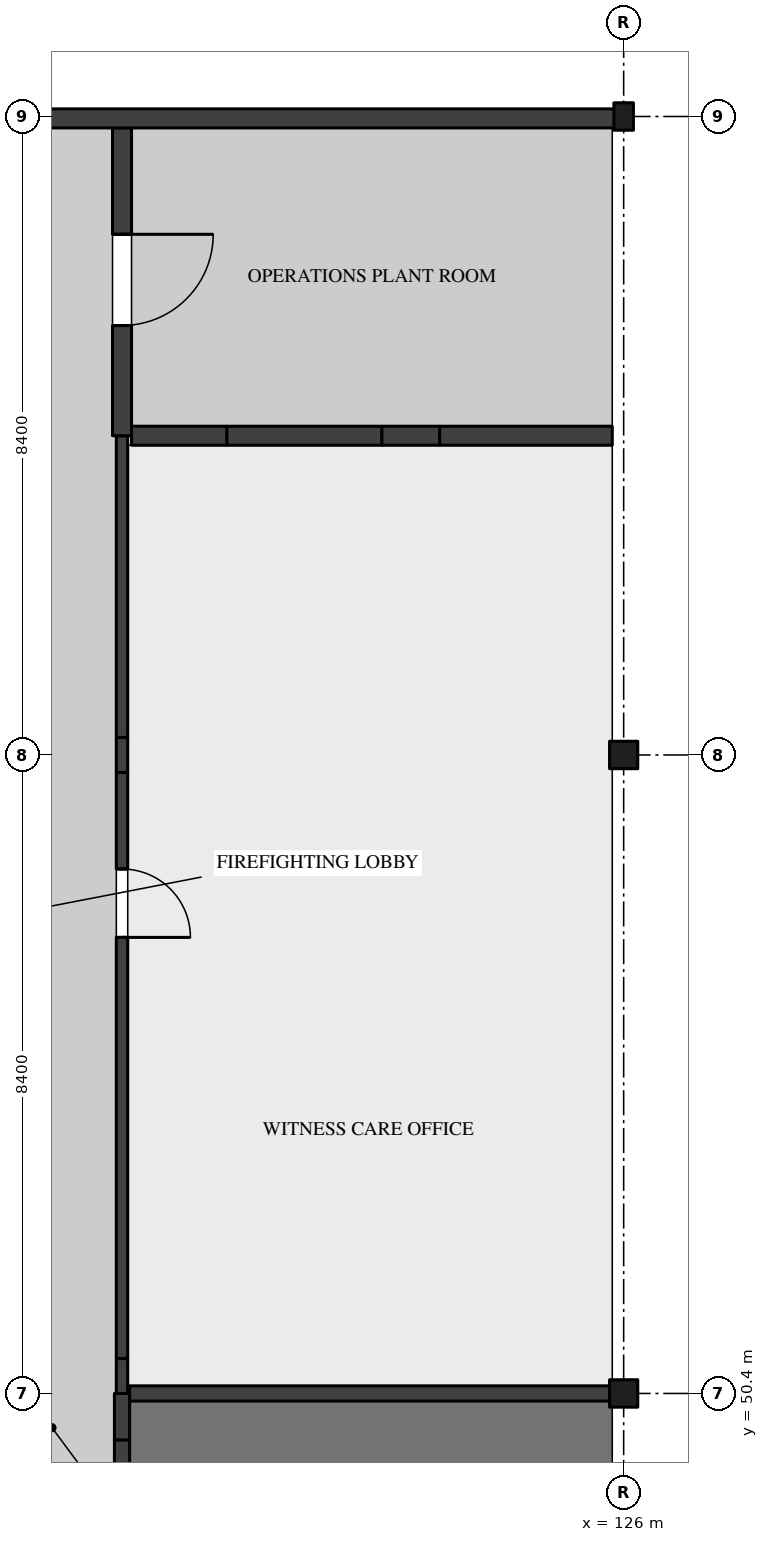
"""IFC4 building model, lengths in metres.
Left out: names, types, materials, properties, quantities, classifications, styles, units other than length and angle.
Written with IfcOpenShell. Run it as: python <this file> out.ifc"""

import sys

from ifc_helpers import new_model, si_unit, direction, frame, frame_2d, origin, origin_2d, place, context, subcontext, project, spatial, rectangle, i_section, extrude, element, fill, save


model = new_model("IFC4")
c1 = context("Model", 3, precision=1e-05, world=origin(), true_north=direction((0.0, 1.0)))
c2 = subcontext(c1, "Body", "Model", "MODEL_VIEW")
j1 = project(units=[si_unit("LENGTHUNIT", "METRE"), si_unit("PLANEANGLEUNIT", "RADIAN")], contexts=[c1])
p1 = place(None, origin())
s1 = spatial("IfcSite", under=j1, at=p1, CompositionType="ELEMENT")
p2 = place(p1, origin())
s2 = spatial("IfcBuilding", under=s1, at=p2, CompositionType="ELEMENT")
p3 = place(p2, frame((0.0, 0.0, 32.4)))
s3 = spatial("IfcBuildingStorey", under=s2, at=p3, CompositionType="ELEMENT", Elevation=32.4)
for number, where, z_axis, x_axis in (
    (1, (126.0, 50.4, 0.0), (0.0, 0.0, 1.0), (1.0, 0.0, 0.0)),
    (2, (126.0, 58.8, 0.0), (0.0, 0.0, 1.0), (1.0, 0.0, 0.0)),
):
    element("IfcColumn", number, at=place(p3, frame(where, z_axis=z_axis, x_axis=x_axis)), inside=s3, PredefinedType="COLUMN", context=c2, shape_type="SweptSolid", body=[
        extrude(i_section(OverallWidth=0.371, OverallDepth=0.361, WebThickness=0.012, FlangeThickness=0.02, FilletRadius=0.015, at=origin_2d()), origin(), (0.0, 0.0, 1.0), 4.37),
    ])
p4 = place(p3, frame((126.0, 67.2, 0.0), z_axis=(0.0, 0.0, 1.0), x_axis=(1.0, 0.0, 0.0)))
e3 = element("IfcColumn", 3, at=p4, inside=s3, PredefinedType="COLUMN", context=c2, shape_type="SweptSolid", body=[
    extrude(i_section(OverallWidth=0.257, OverallDepth=0.361, WebThickness=0.011, FlangeThickness=0.02, FilletRadius=0.015, at=origin_2d()), origin(), (0.0, 0.0, 1.0), 4.37),
])
p5 = place(p3, frame((119.4, 46.2, 0.0), z_axis=(0.0, 0.0, 1.0), x_axis=(0.0, 1.0, 0.0)))
e4 = element("IfcWall", 4, at=p5, inside=s3, PredefinedType="PARTITIONING", context=c2, shape_type="SweptSolid", body=[
    extrude(rectangle(XDim=3.59, YDim=0.2, at=frame_2d((1.795, 0.0))), origin(), (0.0, 0.0, 1.0), 4.37),
])
p6 = place(p5, frame((1.8, 0.0, 0.0)))
e5 = element("IfcOpeningElement", 5, at=p6, cuts=e4, PredefinedType="OPENING", context=c2, shape_type="SweptSolid", body=[
    extrude(rectangle(XDim=1.0, YDim=2.1, at=frame_2d((0.5, 1.05))), frame((0.0, 0.11, 0.0), z_axis=(0.0, -1.0, 0.0), x_axis=(1.0, 0.0, 0.0)), (0.0, 0.0, 1.0), 0.22),
])
p7 = place(p3, frame((119.4, 49.79, 0.0), z_axis=(0.0, 0.0, 1.0), x_axis=(0.0, 1.0, 0.0)))
e6 = element("IfcWall", 6, at=p7, inside=s3, PredefinedType="PARTITIONING", context=c2, shape_type="SweptSolid", body=[
    extrude(rectangle(XDim=0.61, YDim=0.2, at=frame_2d((0.305, 0.0))), origin(), (0.0, 0.0, 1.0), 3.746),
])
p8 = place(p3, frame((119.4, 50.4, 0.0), z_axis=(0.0, 0.0, 1.0), x_axis=(0.0, 1.0, 0.0)))
e7 = element("IfcWall", 7, at=p8, inside=s3, PredefinedType="PARTITIONING", context=c2, shape_type="SweptSolid", body=[
    extrude(rectangle(XDim=0.46, YDim=0.15, at=frame_2d((0.23, 0.0))), origin(), (0.0, 0.0, 1.0), 3.746),
])
p9 = place(p3, frame((119.4, 50.86, 0.0), z_axis=(0.0, 0.0, 1.0), x_axis=(0.0, 1.0, 0.0)))
e8 = element("IfcWall", 8, at=p9, inside=s3, PredefinedType="PARTITIONING", context=c2, shape_type="SweptSolid", body=[
    extrude(rectangle(XDim=7.71, YDim=0.15, at=frame_2d((3.855, 0.0))), origin(), (0.0, 0.0, 1.0), 4.37),
])
p10 = place(p9, frame((5.54, 0.0, 0.0)))
e9 = element("IfcOpeningElement", 9, at=p10, cuts=e8, PredefinedType="OPENING", context=c2, shape_type="SweptSolid", body=[
    extrude(rectangle(XDim=0.9, YDim=2.1, at=frame_2d((0.45, 1.05))), frame((0.0, 0.085, 0.0), z_axis=(0.0, -1.0, 0.0), x_axis=(1.0, 0.0, 0.0)), (0.0, 0.0, 1.0), 0.17),
])
p11 = place(p3, frame((119.4, 58.57, 0.0), z_axis=(0.0, 0.0, 1.0), x_axis=(0.0, 1.0, 0.0)))
e10 = element("IfcWall", 10, at=p11, inside=s3, PredefinedType="PARTITIONING", context=c2, shape_type="SweptSolid", body=[
    extrude(rectangle(XDim=0.46, YDim=0.15, at=frame_2d((0.23, 0.0))), origin(), (0.0, 0.0, 1.0), 3.746),
])
p12 = place(p3, frame((119.4, 59.03, 0.0), z_axis=(0.0, 0.0, 1.0), x_axis=(0.0, 1.0, 0.0)))
e11 = element("IfcWall", 11, at=p12, inside=s3, PredefinedType="PARTITIONING", context=c2, shape_type="SweptSolid", body=[
    extrude(rectangle(XDim=3.97, YDim=0.15, at=frame_2d((1.985, 0.0))), origin(), (0.0, 0.0, 1.0), 4.37),
])
p13 = place(p3, frame((119.4, 63.0, 0.0), z_axis=(0.0, 0.0, 1.0), x_axis=(0.0, 1.0, 0.0)))
e12 = element("IfcWall", 12, at=p13, inside=s3, PredefinedType="PARTITIONING", context=c2, shape_type="SweptSolid", body=[
    extrude(rectangle(XDim=4.05, YDim=0.25, at=frame_2d((2.025, 0.0))), origin(), (0.0, 0.0, 1.0), 4.37),
])
p14 = place(p13, frame((1.45, 0.0, 0.0)))
e13 = element("IfcOpeningElement", 13, at=p14, cuts=e12, PredefinedType="OPENING", context=c2, shape_type="SweptSolid", body=[
    extrude(rectangle(XDim=1.2, YDim=2.4, at=frame_2d((0.6, 1.2))), frame((0.0, 0.135, 0.0), z_axis=(0.0, -1.0, 0.0), x_axis=(1.0, 0.0, 0.0)), (0.0, 0.0, 1.0), 0.27),
])
p15 = place(p3, frame((119.5, 50.4, 0.0), z_axis=(0.0, 0.0, 1.0), x_axis=(1.0, 0.0, 0.0)))
e14 = element("IfcWall", 14, at=p15, inside=s3, PredefinedType="PARTITIONING", context=c2, shape_type="SweptSolid", body=[
    extrude(rectangle(XDim=6.314, YDim=0.2, at=frame_2d((3.157, 0.0))), origin(), (0.0, 0.0, 1.0), 3.746),
])
p16 = place(p3, frame((119.525, 63.0, 0.0), z_axis=(0.0, 0.0, 1.0), x_axis=(1.0, 0.0, 0.0)))
e15 = element("IfcWall", 15, at=p16, inside=s3, PredefinedType="PARTITIONING", context=c2, shape_type="SweptSolid", body=[
    extrude(rectangle(XDim=1.255, YDim=0.25, at=frame_2d((0.627, 0.0))), origin(), (0.0, 0.0, 1.0), 3.895),
])
p17 = place(p3, frame((120.78, 63.0, 0.0), z_axis=(0.0, 0.0, 1.0), x_axis=(1.0, 0.0, 0.0)))
e16 = element("IfcWall", 16, at=p17, inside=s3, PredefinedType="PARTITIONING", context=c2, shape_type="SweptSolid", body=[
    extrude(rectangle(XDim=2.04, YDim=0.25, at=frame_2d((1.02, 0.0))), origin(), (0.0, 0.0, 1.0), 4.37),
])
p18 = place(p3, frame((122.82, 63.0, 0.0), z_axis=(0.0, 0.0, 1.0), x_axis=(1.0, 0.0, 0.0)))
e17 = element("IfcWall", 17, at=p18, inside=s3, PredefinedType="PARTITIONING", context=c2, shape_type="SweptSolid", body=[
    extrude(rectangle(XDim=0.76, YDim=0.25, at=frame_2d((0.38, 0.0))), origin(), (0.0, 0.0, 1.0), 3.895),
])
p19 = place(p3, frame((123.58, 63.0, 0.0), z_axis=(0.0, 0.0, 1.0), x_axis=(1.0, 0.0, 0.0)))
e18 = element("IfcWall", 18, at=p19, inside=s3, PredefinedType="PARTITIONING", context=c2, shape_type="SweptSolid", body=[
    extrude(rectangle(XDim=2.27, YDim=0.25, at=frame_2d((1.135, 0.0))), origin(), (0.0, 0.0, 1.0), 4.37),
])
p20 = place(p3, frame((125.996, 67.175, 0.0), z_axis=(0.0, 0.0, 1.0), x_axis=(-1.0, 0.0, 0.0)))
e19 = element("IfcWall", 19, at=p20, inside=s3, PredefinedType="SOLIDWALL", context=c2, shape_type="SweptSolid", body=[
    extrude(rectangle(XDim=8.196, YDim=0.25, at=frame_2d((4.098, 0.0))), origin(), (0.0, 0.0, 1.0), 3.746),
])
p21 = place(p10, frame((0.9, 0.0, 0.0), z_axis=(0.0, 0.0, 1.0), x_axis=(-1.0, 0.0, 0.0)))
e20 = element("IfcDoor", 20, at=p21, inside=s3, OperationType="SINGLE_SWING_LEFT", PredefinedType="DOOR", context=c2, shape_type="SweptSolid", body=[
    extrude(rectangle(XDim=0.9, YDim=2.1, at=frame_2d((0.45, 1.05))), frame((0.0, 0.025, 0.0), z_axis=(0.0, -1.0, 0.0), x_axis=(1.0, 0.0, 0.0)), (0.0, 0.0, 1.0), 0.05),
])
fill(e9, e20)
p22 = place(p14, frame((1.2, 0.0, 0.0), z_axis=(0.0, 0.0, 1.0), x_axis=(-1.0, 0.0, 0.0)))
e21 = element("IfcDoor", 21, at=p22, inside=s3, OperationType="SINGLE_SWING_RIGHT", PredefinedType="DOOR", context=c2, shape_type="SweptSolid", body=[
    extrude(rectangle(XDim=1.2, YDim=2.4, at=frame_2d((0.6, 1.2))), frame((0.0, 0.05, 0.0), z_axis=(0.0, -1.0, 0.0), x_axis=(1.0, 0.0, 0.0)), (0.0, 0.0, 1.0), 0.1),
])
fill(e13, e21)
save(model, sys.argv[1])
